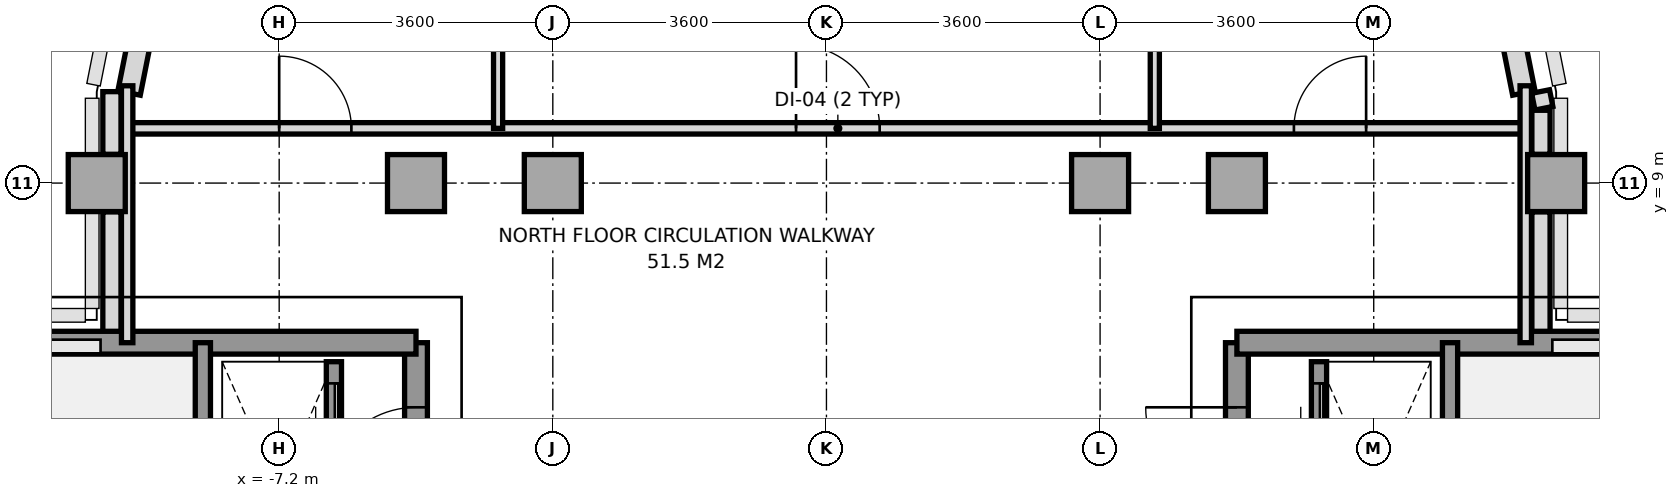
"""IFC4 building model, lengths in metres.
Left out: names, types, materials, properties, quantities, classifications, styles, units other than length and angle.
Written with IfcOpenShell. Run it as: python <this file> out.ifc"""

import sys

from ifc_helpers import new_model, si_unit, direction, frame, frame_2d, origin, origin_2d, place, context, subcontext, project, spatial, rectangle, extrude, source, transform, mapped, element, fill, save


model = new_model("IFC4")
c1 = context("Model", 3, precision=1e-05, world=origin(), true_north=direction((0.0, 1.0)))
c2 = subcontext(c1, "Body", "Model", "MODEL_VIEW")
j1 = project(units=[si_unit("LENGTHUNIT", "METRE"), si_unit("PLANEANGLEUNIT", "RADIAN")], contexts=[c1])
p1 = place(None, origin())
s1 = spatial("IfcSite", under=j1, at=p1, CompositionType="ELEMENT")
p2 = place(p1, origin())
s2 = spatial("IfcBuilding", under=s1, at=p2, CompositionType="ELEMENT")
p3 = place(p2, frame((0.0, 0.0, 226.8)))
s3 = spatial("IfcBuildingStorey", under=s2, at=p3, CompositionType="ELEMENT", Elevation=226.8)
m1 = source(origin(), c2, "Body", "SweptSolid", [
    extrude(rectangle(XDim=0.75, YDim=0.75, at=origin_2d()), origin(), (0.0, 0.0, 1.0), 3.01),
])
for number, where, z_axis, x_axis in (
    (1, (-9.6, 9.0, 0.0), (0.0, 0.0, 1.0), (1.0, 0.0, 0.0)),
    (2, (-5.4, 9.0, 0.0), (0.0, 0.0, 1.0), (1.0, 0.0, 0.0)),
    (3, (-3.6, 9.0, 0.0), (0.0, 0.0, 1.0), (1.0, 0.0, 0.0)),
    (4, (3.6, 9.0, 0.0), (0.0, 0.0, 1.0), (1.0, 0.0, 0.0)),
    (5, (5.4, 9.0, 0.0), (0.0, 0.0, 1.0), (1.0, 0.0, 0.0)),
    (6, (9.6, 9.0, 0.0), (0.0, 0.0, 1.0), (1.0, 0.0, 0.0)),
):
    element("IfcColumn", number, at=place(p3, frame(where, z_axis=z_axis, x_axis=x_axis)), inside=s3, PredefinedType="COLUMN", context=c2, shape_type="MappedRepresentation", body=[
        mapped(m1, transform((0.0, 0.0, 0.0), x_axis=(1.0, 0.0, 0.0), y_axis=(0.0, 1.0, 0.0), z_axis=(0.0, 0.0, 1.0), scale=1.0)),
    ])
for number, where, z_axis, x_axis in (
    (7, (9.175, 10.185, 0.0), (0.0, 0.0, 1.0), (-0.195, 0.981, 0.0)),
    (8, (-8.471, 13.725, 0.0), (0.0, 0.0, 1.0), (-0.195, -0.981, 0.0)),
):
    element("IfcWall", number, at=place(p3, frame(where, z_axis=z_axis, x_axis=x_axis)), inside=s3, PredefinedType="SOLIDWALL", context=c2, shape_type="SweptSolid", body=[
        extrude(rectangle(XDim=3.609, YDim=0.3, at=frame_2d((1.804, 0.0))), origin(), (0.0, 0.0, 1.0), 3.01),
    ])
p4 = place(p3, frame((-9.4, 6.953, 0.0), z_axis=(0.0, 0.0, 1.0), x_axis=(0.0, 1.0, 0.0)))
e9 = element("IfcWall", 9, at=p4, inside=s3, PredefinedType="PARAPET", context=c2, shape_type="SweptSolid", body=[
    extrude(rectangle(XDim=1.669, YDim=0.24, at=frame_2d((0.834, 0.0))), origin(), (0.0, 0.0, 1.0), 1.15),
])
p5 = place(p3, frame((-9.4, 9.378, 0.0), z_axis=(0.0, 0.0, 1.0), x_axis=(0.0, 1.0, 0.0)))
e10 = element("IfcWall", 10, at=p5, inside=s3, PredefinedType="PARAPET", context=c2, shape_type="SweptSolid", body=[
    extrude(rectangle(XDim=0.825, YDim=0.24, at=frame_2d((0.413, 0.0))), origin(), (0.0, 0.0, 1.0), 1.15),
])
p6 = place(p3, frame((9.395, 10.204, 0.0), z_axis=(0.0, 0.0, 1.0), x_axis=(0.194859894132, -0.980831087221, 0.0)))
e11 = element("IfcWall", 11, at=p6, inside=s3, PredefinedType="PARAPET", context=c2, shape_type="SweptSolid", body=[
    extrude(rectangle(XDim=0.224, YDim=0.24, at=frame_2d((0.112, 0.0))), origin(), (0.0, 0.0, 1.0), 1.15),
])
p7 = place(p3, frame((9.4, 9.958, 0.0), z_axis=(0.0, 0.0, 1.0), x_axis=(0.0, -1.0, 0.0)))
e12 = element("IfcWall", 12, at=p7, inside=s3, PredefinedType="PARAPET", context=c2, shape_type="SweptSolid", body=[
    extrude(rectangle(XDim=0.58, YDim=0.24, at=frame_2d((0.29, 0.0))), origin(), (0.0, 0.0, 1.0), 1.15),
])
p8 = place(p3, frame((9.4, 8.622, 0.0), z_axis=(0.0, 0.0, 1.0), x_axis=(0.0, -1.0, 0.0)))
e13 = element("IfcWall", 13, at=p8, inside=s3, PredefinedType="PARAPET", context=c2, shape_type="SweptSolid", body=[
    extrude(rectangle(XDim=1.669, YDim=0.24, at=frame_2d((0.834, 0.0))), origin(), (0.0, 0.0, 1.0), 1.15),
])
p9 = place(p3, frame((-5.4, -5.6, 0.0), z_axis=(0.0, 0.0, 1.0), x_axis=(0.0, 1.0, 0.0)))
e14 = element("IfcWall", 14, at=p9, inside=s3, PredefinedType="SHEAR", context=c2, shape_type="SweptSolid", body=[
    extrude(rectangle(XDim=12.5, YDim=0.3, at=frame_2d((6.25, 0.0))), origin(), (0.0, 0.0, 1.0), 3.01),
])
p10 = place(p9, frame((4.55, 0.0, 0.0)))
e15 = element("IfcOpeningElement", 15, at=p10, cuts=e14, PredefinedType="OPENING", context=c2, shape_type="SweptSolid", body=[
    extrude(rectangle(XDim=1.2, YDim=2.2, at=frame_2d((0.6, 1.1))), frame((0.0, 0.16, 0.0), z_axis=(0.0, -1.0, 0.0), x_axis=(1.0, 0.0, 0.0)), (0.0, 0.0, 1.0), 0.32),
])
p11 = place(p9, frame((10.45, 0.0, 0.0)))
e16 = element("IfcOpeningElement", 16, at=p11, cuts=e14, PredefinedType="OPENING", context=c2, shape_type="SweptSolid", body=[
    extrude(rectangle(XDim=1.2, YDim=2.2, at=frame_2d((0.6, 1.1))), frame((0.0, 0.16, 0.0), z_axis=(0.0, -1.0, 0.0), x_axis=(1.0, 0.0, 0.0)), (0.0, 0.0, 1.0), 0.32),
])
p12 = place(p9, frame((6.86, 0.0, 0.0)))
e17 = element("IfcOpeningElement", 17, at=p12, cuts=e14, PredefinedType="OPENING", context=c2, shape_type="SweptSolid", body=[
    extrude(rectangle(XDim=0.8, YDim=2.1, at=frame_2d((0.4, 1.05))), frame((0.0, 0.16, 0.0), z_axis=(0.0, -1.0, 0.0), x_axis=(1.0, 0.0, 0.0)), (0.0, 0.0, 1.0), 0.32),
])
p13 = place(p3, frame((-11.356, 6.9, 0.0), z_axis=(0.0, 0.0, 1.0), x_axis=(1.0, 0.0, 0.0)))
e18 = element("IfcWall", 18, at=p13, inside=s3, PredefinedType="SHEAR", context=c2, shape_type="SweptSolid", body=[
    extrude(rectangle(XDim=5.956, YDim=0.3, at=frame_2d((2.978, 0.0))), origin(), (0.0, 0.0, 1.0), 3.01),
])
p14 = place(p3, frame((-8.204, -0.016, 0.0), z_axis=(0.0, 0.0, 1.0), x_axis=(0.0, 1.0, 0.0)))
e19 = element("IfcWall", 19, at=p14, inside=s3, PredefinedType="SOLIDWALL", context=c2, shape_type="SweptSolid", body=[
    extrude(rectangle(XDim=6.916, YDim=0.2, at=frame_2d((3.458, 0.0))), origin(), (0.0, 0.0, 1.0), 3.01),
])
p15 = place(p14, frame((0.2, 0.0, 0.0)))
e20 = element("IfcOpeningElement", 20, at=p15, cuts=e19, PredefinedType="OPENING", context=c2, shape_type="SweptSolid", body=[
    extrude(rectangle(XDim=1.2, YDim=2.2, at=frame_2d((0.6, 1.1))), frame((0.0, 0.11, 0.0), z_axis=(0.0, -1.0, 0.0), x_axis=(1.0, 0.0, 0.0)), (0.0, 0.0, 1.0), 0.22),
])
p16 = place(p3, frame((5.4, -5.6, 0.0), z_axis=(0.0, 0.0, 1.0), x_axis=(0.0, 1.0, 0.0)))
e21 = element("IfcWall", 21, at=p16, inside=s3, PredefinedType="SHEAR", context=c2, shape_type="SweptSolid", body=[
    extrude(rectangle(XDim=12.5, YDim=0.3, at=frame_2d((6.25, 0.0))), origin(), (0.0, 0.0, 1.0), 3.01),
])
p17 = place(p16, frame((4.55, 0.0, 0.0)))
e22 = element("IfcOpeningElement", 22, at=p17, cuts=e21, PredefinedType="OPENING", context=c2, shape_type="SweptSolid", body=[
    extrude(rectangle(XDim=1.2, YDim=2.2, at=frame_2d((0.6, 1.1))), frame((0.0, 0.16, 0.0), z_axis=(0.0, -1.0, 0.0), x_axis=(1.0, 0.0, 0.0)), (0.0, 0.0, 1.0), 0.32),
])
p18 = place(p16, frame((10.45, 0.0, 0.0)))
e23 = element("IfcOpeningElement", 23, at=p18, cuts=e21, PredefinedType="OPENING", context=c2, shape_type="SweptSolid", body=[
    extrude(rectangle(XDim=1.2, YDim=2.2, at=frame_2d((0.6, 1.1))), frame((0.0, 0.16, 0.0), z_axis=(0.0, -1.0, 0.0), x_axis=(1.0, 0.0, 0.0)), (0.0, 0.0, 1.0), 0.32),
])
p19 = place(p16, frame((6.86, 0.0, 0.0)))
e24 = element("IfcOpeningElement", 24, at=p19, cuts=e21, PredefinedType="OPENING", context=c2, shape_type="SweptSolid", body=[
    extrude(rectangle(XDim=0.8, YDim=2.1, at=frame_2d((0.4, 1.05))), frame((0.0, 0.16, 0.0), z_axis=(0.0, -1.0, 0.0), x_axis=(1.0, 0.0, 0.0)), (0.0, 0.0, 1.0), 0.32),
])
p20 = place(p16, frame((7.88, 0.0, 0.0)))
e25 = element("IfcOpeningElement", 25, at=p20, cuts=e21, PredefinedType="OPENING", context=c2, shape_type="SweptSolid", body=[
    extrude(rectangle(XDim=0.8, YDim=2.1, at=frame_2d((0.4, 1.05))), frame((0.0, 0.16, 0.0), z_axis=(0.0, -1.0, 0.0), x_axis=(1.0, 0.0, 0.0)), (0.0, 0.0, 1.0), 0.32),
])
p21 = place(p3, frame((5.4, 6.9, 0.0), z_axis=(0.0, 0.0, 1.0), x_axis=(1.0, 0.0, 0.0)))
e26 = element("IfcWall", 26, at=p21, inside=s3, PredefinedType="SHEAR", context=c2, shape_type="SweptSolid", body=[
    extrude(rectangle(XDim=5.956, YDim=0.3, at=frame_2d((2.978, 0.0))), origin(), (0.0, 0.0, 1.0), 3.01),
])
p22 = place(p3, frame((8.204, -0.016, 0.0), z_axis=(0.0, 0.0, 1.0), x_axis=(0.0, 1.0, 0.0)))
e27 = element("IfcWall", 27, at=p22, inside=s3, PredefinedType="SOLIDWALL", context=c2, shape_type="SweptSolid", body=[
    extrude(rectangle(XDim=6.916, YDim=0.2, at=frame_2d((3.458, 0.0))), origin(), (0.0, 0.0, 1.0), 3.01),
])
p23 = place(p22, frame((0.2, 0.0, 0.0)))
e28 = element("IfcOpeningElement", 28, at=p23, cuts=e27, PredefinedType="OPENING", context=c2, shape_type="SweptSolid", body=[
    extrude(rectangle(XDim=1.2, YDim=2.2, at=frame_2d((0.6, 1.1))), frame((0.0, 0.11, 0.0), z_axis=(0.0, -1.0, 0.0), x_axis=(1.0, 0.0, 0.0)), (0.0, 0.0, 1.0), 0.22),
])
p24 = place(p3, frame((-6.48, 4.98, 0.0), z_axis=(0.0, 0.0, 1.0), x_axis=(0.0, 1.0, 0.0)))
e29 = element("IfcWall", 29, at=p24, inside=s3, PredefinedType="SOLIDWALL", context=c2, shape_type="SweptSolid", body=[
    extrude(rectangle(XDim=1.67, YDim=0.2, at=frame_2d((0.835, 0.0))), origin(), (0.0, 0.0, 1.0), 3.01),
])
p25 = place(p24, frame((0.285, 0.0, 0.0)))
e30 = element("IfcOpeningElement", 30, at=p25, cuts=e29, PredefinedType="OPENING", context=c2, shape_type="SweptSolid", body=[
    extrude(rectangle(XDim=1.1, YDim=2.2, at=frame_2d((0.55, 1.1))), frame((0.0, 0.11, 0.0), z_axis=(0.0, -1.0, 0.0), x_axis=(1.0, 0.0, 0.0)), (0.0, 0.0, 1.0), 0.22),
])
p26 = place(p3, frame((6.48, 4.98, 0.0), z_axis=(0.0, 0.0, 1.0), x_axis=(0.0, 1.0, 0.0)))
e31 = element("IfcWall", 31, at=p26, inside=s3, PredefinedType="SOLIDWALL", context=c2, shape_type="SweptSolid", body=[
    extrude(rectangle(XDim=1.67, YDim=0.2, at=frame_2d((0.835, 0.0))), origin(), (0.0, 0.0, 1.0), 3.01),
])
p27 = place(p26, frame((0.285, 0.0, 0.0)))
e32 = element("IfcOpeningElement", 32, at=p27, cuts=e31, PredefinedType="OPENING", context=c2, shape_type="SweptSolid", body=[
    extrude(rectangle(XDim=1.1, YDim=2.2, at=frame_2d((0.55, 1.1))), frame((0.0, 0.11, 0.0), z_axis=(0.0, -1.0, 0.0), x_axis=(1.0, 0.0, 0.0)), (0.0, 0.0, 1.0), 0.22),
])
p28 = place(p3, frame((-9.2, 9.72, 0.0), z_axis=(0.0, 0.0, 1.0), x_axis=(1.0, 0.0, 0.0)))
e33 = element("IfcWall", 33, at=p28, inside=s3, PredefinedType="PARTITIONING", context=c2, shape_type="SweptSolid", body=[
    extrude(rectangle(XDim=18.4, YDim=0.15, at=frame_2d((9.2, 0.0))), origin(), (0.0, 0.0, 1.0), 3.01),
])
p29 = place(p28, frame((2.0, 0.0, 0.0)))
e34 = element("IfcOpeningElement", 34, at=p29, cuts=e33, PredefinedType="OPENING", context=c2, shape_type="SweptSolid", body=[
    extrude(rectangle(XDim=0.95, YDim=2.15, at=frame_2d((0.475, 1.075))), frame((0.0, 0.085, 0.0), z_axis=(0.0, -1.0, 0.0), x_axis=(1.0, 0.0, 0.0)), (0.0, 0.0, 1.0), 0.17),
])
p30 = place(p28, frame((15.35, 0.0, 0.0)))
e35 = element("IfcOpeningElement", 35, at=p30, cuts=e33, PredefinedType="OPENING", context=c2, shape_type="SweptSolid", body=[
    extrude(rectangle(XDim=0.95, YDim=2.15, at=frame_2d((0.475, 1.075))), frame((0.0, 0.085, 0.0), z_axis=(0.0, -1.0, 0.0), x_axis=(1.0, 0.0, 0.0)), (0.0, 0.0, 1.0), 0.17),
])
p31 = place(p28, frame((8.8, 0.0, 0.0)))
e36 = element("IfcOpeningElement", 36, at=p31, cuts=e33, PredefinedType="OPENING", context=c2, shape_type="SweptSolid", body=[
    extrude(rectangle(XDim=1.1, YDim=2.2, at=frame_2d((0.55, 1.1))), frame((0.0, 0.085, 0.0), z_axis=(0.0, -1.0, 0.0), x_axis=(1.0, 0.0, 0.0)), (0.0, 0.0, 1.0), 0.17),
])
for number, where, z_axis, x_axis in (
    (37, (-9.2, 6.9, 0.0), (0.0, 0.0, 1.0), (0.0, 1.0, 0.0)),
    (38, (9.2, 6.9, 0.0), (0.0, 0.0, 1.0), (0.0, 1.0, 0.0)),
):
    element("IfcWall", number, at=place(p3, frame(where, z_axis=z_axis, x_axis=x_axis)), inside=s3, PredefinedType="PARTITIONING", context=c2, shape_type="SweptSolid", body=[
        extrude(rectangle(XDim=3.38, YDim=0.15, at=frame_2d((1.69, 0.0))), origin(), (0.0, 0.0, 1.0), 2.61),
    ])
for number, where, z_axis, x_axis in (
    (39, (-4.32, 9.72, 0.0), (0.0, 0.0, 1.0), (0.0, 1.0, 0.0)),
    (40, (4.32, 9.72, 0.0), (0.0, 0.0, 1.0), (0.0, 1.0, 0.0)),
):
    element("IfcWall", number, at=place(p3, frame(where, z_axis=z_axis, x_axis=x_axis)), inside=s3, PredefinedType="PARTITIONING", context=c2, shape_type="SweptSolid", body=[
        extrude(rectangle(XDim=4.42, YDim=0.12, at=frame_2d((2.21, 0.0))), origin(), (0.0, 0.0, 1.0), 3.01),
    ])
m2 = source(origin(), c2, "Body", "SweptSolid", [
    extrude(rectangle(XDim=1.2, YDim=2.2, at=frame_2d((0.6, 1.1))), frame((0.0, 0.025, 0.0), z_axis=(0.0, -1.0, 0.0), x_axis=(1.0, 0.0, 0.0)), (0.0, 0.0, 1.0), 0.05),
])
p32 = place(p11, origin())
e41 = element("IfcDoor", 41, at=p32, inside=s3, OperationType="SINGLE_SWING_LEFT", PredefinedType="DOOR", context=c2, shape_type="MappedRepresentation", body=[
    mapped(m2, transform((0.0, 0.0, 0.0), x_axis=(1.0, 0.0, 0.0), y_axis=(0.0, 1.0, 0.0), z_axis=(0.0, 0.0, 1.0), scale=1.0)),
])
fill(e16, e41)
p33 = place(p18, origin())
e42 = element("IfcDoor", 42, at=p33, inside=s3, OperationType="SINGLE_SWING_RIGHT", PredefinedType="DOOR", context=c2, shape_type="MappedRepresentation", body=[
    mapped(m2, transform((0.0, 0.0, 0.0), x_axis=(1.0, 0.0, 0.0), y_axis=(0.0, 1.0, 0.0), z_axis=(0.0, 0.0, 1.0), scale=1.0)),
])
fill(e23, e42)
m3 = source(origin(), c2, "Body", "SweptSolid", [
    extrude(rectangle(XDim=1.1, YDim=2.2, at=frame_2d((0.55, 1.1))), frame((0.0, 0.025, 0.0), z_axis=(0.0, -1.0, 0.0), x_axis=(1.0, 0.0, 0.0)), (0.0, 0.0, 1.0), 0.05),
])
p34 = place(p25, origin())
e43 = element("IfcDoor", 43, at=p34, inside=s3, OperationType="SLIDING_TO_LEFT", PredefinedType="DOOR", context=c2, shape_type="MappedRepresentation", body=[
    mapped(m3, transform((0.0, 0.0, 0.0), x_axis=(1.0, 0.0, 0.0), y_axis=(0.0, 1.0, 0.0), z_axis=(0.0, 0.0, 1.0), scale=1.0)),
])
fill(e30, e43)
p35 = place(p27, origin())
e44 = element("IfcDoor", 44, at=p35, inside=s3, OperationType="SLIDING_TO_LEFT", PredefinedType="DOOR", context=c2, shape_type="MappedRepresentation", body=[
    mapped(m3, transform((0.0, 0.0, 0.0), x_axis=(1.0, 0.0, 0.0), y_axis=(0.0, 1.0, 0.0), z_axis=(0.0, 0.0, 1.0), scale=1.0)),
])
fill(e32, e44)
m4 = source(origin(), c2, "Body", "SweptSolid", [
    extrude(rectangle(XDim=0.95, YDim=2.15, at=frame_2d((0.475, 1.075))), frame((0.0, 0.025, 0.0), z_axis=(0.0, -1.0, 0.0), x_axis=(1.0, 0.0, 0.0)), (0.0, 0.0, 1.0), 0.05),
])
p36 = place(p29, origin())
e45 = element("IfcDoor", 45, at=p36, inside=s3, OperationType="SINGLE_SWING_LEFT", PredefinedType="DOOR", context=c2, shape_type="MappedRepresentation", body=[
    mapped(m4, transform((0.0, 0.0, 0.0), x_axis=(1.0, 0.0, 0.0), y_axis=(0.0, 1.0, 0.0), z_axis=(0.0, 0.0, 1.0), scale=1.0)),
])
fill(e34, e45)
p37 = place(p30, origin())
e46 = element("IfcDoor", 46, at=p37, inside=s3, OperationType="SINGLE_SWING_RIGHT", PredefinedType="DOOR", context=c2, shape_type="MappedRepresentation", body=[
    mapped(m4, transform((0.0, 0.0, 0.0), x_axis=(1.0, 0.0, 0.0), y_axis=(0.0, 1.0, 0.0), z_axis=(0.0, 0.0, 1.0), scale=1.0)),
])
fill(e35, e46)
p38 = place(p31, origin())
e47 = element("IfcDoor", 47, at=p38, inside=s3, OperationType="SINGLE_SWING_LEFT", PredefinedType="DOOR", context=c2, shape_type="MappedRepresentation", body=[
    mapped(m3, transform((0.0, 0.0, 0.0), x_axis=(1.0, 0.0, 0.0), y_axis=(0.0, 1.0, 0.0), z_axis=(0.0, 0.0, 1.0), scale=1.0)),
])
fill(e36, e47)
save(model, sys.argv[1])
